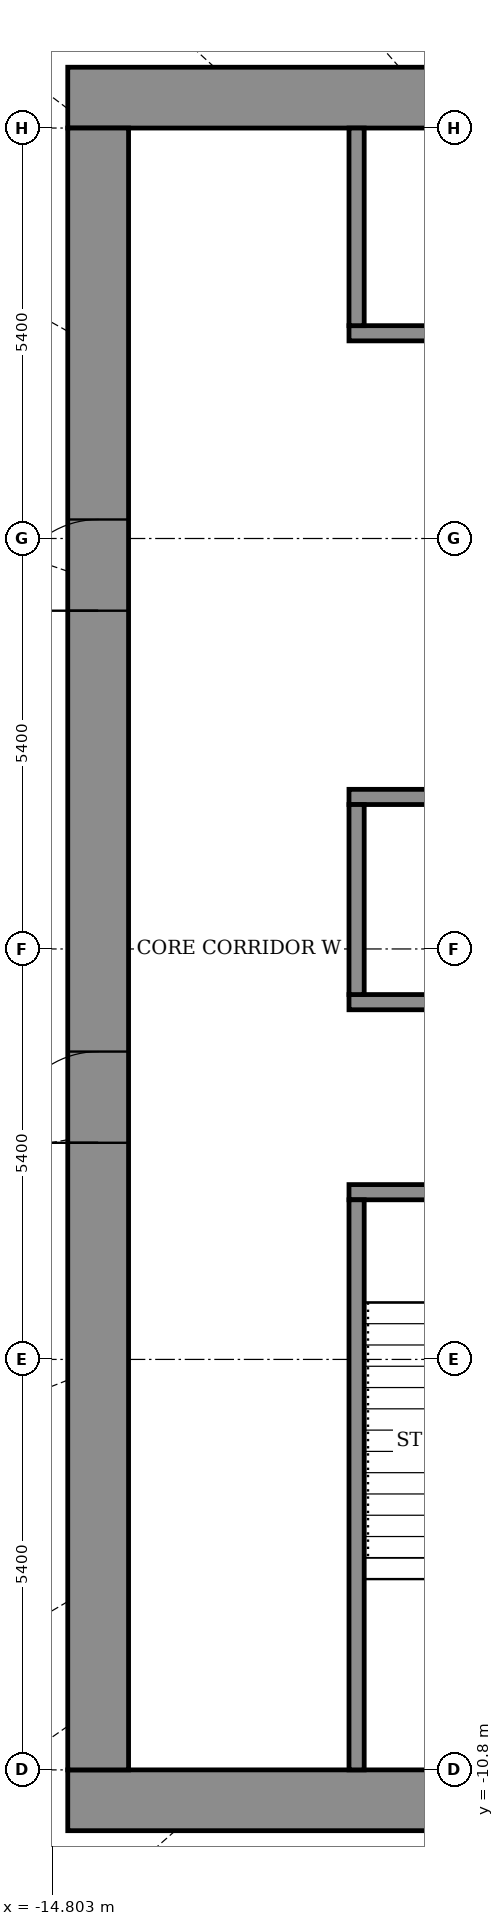
"""IFC4 building model, lengths in metres.
Left out: names, types, materials, properties, quantities, classifications, styles, units other than length and angle.
Written with IfcOpenShell. Run it as: python <this file> out.ifc"""

import sys

from ifc_helpers import new_model, si_unit, direction, frame, frame_2d, origin, place, context, subcontext, project, spatial, rectangle, extrude, element, fill, save


model = new_model("IFC4")
c1 = context("Model", 3, precision=1e-05, world=origin(), true_north=direction((0.0, 1.0)))
c2 = subcontext(c1, "Body", "Model", "MODEL_VIEW")
j1 = project(units=[si_unit("LENGTHUNIT", "METRE"), si_unit("PLANEANGLEUNIT", "RADIAN")], contexts=[c1])
p1 = place(None, origin())
s1 = spatial("IfcSite", under=j1, at=p1, CompositionType="ELEMENT")
p2 = place(p1, origin())
s2 = spatial("IfcBuilding", under=s1, at=p2, CompositionType="ELEMENT")
p3 = place(p2, frame((0.0, 0.0, 193.3)))
s3 = spatial("IfcBuildingStorey", under=s2, at=p3, CompositionType="ELEMENT", Elevation=193.3)
for number, where, z_axis, x_axis in (
    (1, (-14.6, -11.2, 0.0), (0.0, 0.0, 1.0), (1.0, 0.0, 0.0)),
    (2, (-14.6, 11.2, 0.0), (0.0, 0.0, 1.0), (1.0, 0.0, 0.0)),
):
    element("IfcWall", number, at=place(p3, frame(where, z_axis=z_axis, x_axis=x_axis)), inside=s3, PredefinedType="SHEAR", context=c2, shape_type="SweptSolid", body=[
        extrude(rectangle(XDim=29.2, YDim=0.8, at=frame_2d((14.6, 0.0))), origin(), (0.0, 0.0, 1.0), 4.6),
    ])
p4 = place(p3, frame((-14.2, -10.8, 0.0), z_axis=(0.0, 0.0, 1.0), x_axis=(0.0, 1.0, 0.0)))
e3 = element("IfcWall", 3, at=p4, inside=s3, PredefinedType="SHEAR", context=c2, shape_type="SweptSolid", body=[
    extrude(rectangle(XDim=21.6, YDim=0.8, at=frame_2d((10.8, 0.0))), origin(), (0.0, 0.0, 1.0), 4.6),
])
p5 = place(p4, frame((8.25, 0.0, 0.0)))
e4 = element("IfcOpeningElement", 4, at=p5, cuts=e3, PredefinedType="OPENING", context=c2, shape_type="SweptSolid", body=[
    extrude(rectangle(XDim=1.2, YDim=2.1, at=frame_2d((0.6, 1.05))), frame((0.0, 0.41, 0.0), z_axis=(0.0, -1.0, 0.0), x_axis=(1.0, 0.0, 0.0)), (0.0, 0.0, 1.0), 0.82),
])
p6 = place(p4, frame((15.25, 0.0, 0.0)))
e5 = element("IfcOpeningElement", 5, at=p6, cuts=e3, PredefinedType="OPENING", context=c2, shape_type="SweptSolid", body=[
    extrude(rectangle(XDim=1.2, YDim=2.1, at=frame_2d((0.6, 1.05))), frame((0.0, 0.41, 0.0), z_axis=(0.0, -1.0, 0.0), x_axis=(1.0, 0.0, 0.0)), (0.0, 0.0, 1.0), 0.82),
])
p7 = place(p3, frame((-10.9, -3.2, 0.0), z_axis=(0.0, 0.0, 1.0), x_axis=(1.0, 0.0, 0.0)))
e6 = element("IfcWall", 6, at=p7, inside=s3, PredefinedType="SHEAR", context=c2, shape_type="SweptSolid", body=[
    extrude(rectangle(XDim=21.8, YDim=0.2, at=frame_2d((10.9, 0.0))), origin(), (0.0, 0.0, 1.0), 4.05),
])
p8 = place(p7, frame((1.075, 0.0, 0.0)))
e7 = element("IfcOpeningElement", 7, at=p8, cuts=e6, PredefinedType="OPENING", context=c2, shape_type="SweptSolid", body=[
    extrude(rectangle(XDim=1.1, YDim=2.1, at=frame_2d((0.55, 1.05))), frame((0.0, 0.11, 0.0), z_axis=(0.0, -1.0, 0.0), x_axis=(1.0, 0.0, 0.0)), (0.0, 0.0, 1.0), 0.22),
])
p9 = place(p7, frame((10.325, 0.0, 0.0)))
e8 = element("IfcOpeningElement", 8, at=p9, cuts=e6, PredefinedType="OPENING", context=c2, shape_type="SweptSolid", body=[
    extrude(rectangle(XDim=1.1, YDim=2.1, at=frame_2d((0.55, 1.05))), frame((0.0, 0.11, 0.0), z_axis=(0.0, -1.0, 0.0), x_axis=(1.0, 0.0, 0.0)), (0.0, 0.0, 1.0), 0.22),
])
p10 = place(p7, frame((19.625, 0.0, 0.0)))
e9 = element("IfcOpeningElement", 9, at=p10, cuts=e6, PredefinedType="OPENING", context=c2, shape_type="SweptSolid", body=[
    extrude(rectangle(XDim=1.1, YDim=2.1, at=frame_2d((0.55, 1.05))), frame((0.0, 0.11, 0.0), z_axis=(0.0, -1.0, 0.0), x_axis=(1.0, 0.0, 0.0)), (0.0, 0.0, 1.0), 0.22),
])
p11 = place(p7, frame((5.7, 0.0, 0.0)))
e10 = element("IfcOpeningElement", 10, at=p11, cuts=e6, PredefinedType="OPENING", context=c2, shape_type="SweptSolid", body=[
    extrude(rectangle(XDim=1.1, YDim=2.1, at=frame_2d((0.55, 1.05))), frame((0.0, 0.11, 0.0), z_axis=(0.0, -1.0, 0.0), x_axis=(1.0, 0.0, 0.0)), (0.0, 0.0, 1.0), 0.22),
])
p12 = place(p7, frame((14.975, 0.0, 0.0)))
e11 = element("IfcOpeningElement", 11, at=p12, cuts=e6, PredefinedType="OPENING", context=c2, shape_type="SweptSolid", body=[
    extrude(rectangle(XDim=1.1, YDim=2.1, at=frame_2d((0.55, 1.05))), frame((0.0, 0.11, 0.0), z_axis=(0.0, -1.0, 0.0), x_axis=(1.0, 0.0, 0.0)), (0.0, 0.0, 1.0), 0.22),
])
p13 = place(p3, frame((-10.9, -0.7, 0.0), z_axis=(0.0, 0.0, 1.0), x_axis=(1.0, 0.0, 0.0)))
e12 = element("IfcWall", 12, at=p13, inside=s3, PredefinedType="SHEAR", context=c2, shape_type="SweptSolid", body=[
    extrude(rectangle(XDim=21.8, YDim=0.2, at=frame_2d((10.9, 0.0))), origin(), (0.0, 0.0, 1.0), 4.05),
])
p14 = place(p3, frame((-10.9, 2.0, 0.0), z_axis=(0.0, 0.0, 1.0), x_axis=(1.0, 0.0, 0.0)))
e13 = element("IfcWall", 13, at=p14, inside=s3, PredefinedType="SHEAR", context=c2, shape_type="SweptSolid", body=[
    extrude(rectangle(XDim=21.8, YDim=0.2, at=frame_2d((10.9, 0.0))), origin(), (0.0, 0.0, 1.0), 4.05),
])
p15 = place(p14, frame((14.4, 0.0, 0.0)))
e14 = element("IfcOpeningElement", 14, at=p15, cuts=e13, PredefinedType="OPENING", context=c2, shape_type="SweptSolid", body=[
    extrude(rectangle(XDim=1.1, YDim=2.1, at=frame_2d((0.55, 1.05))), frame((0.0, 0.11, 0.0), z_axis=(0.0, -1.0, 0.0), x_axis=(1.0, 0.0, 0.0)), (0.0, 0.0, 1.0), 0.22),
])
p16 = place(p14, frame((17.1, 0.0, 0.0)))
e15 = element("IfcOpeningElement", 15, at=p16, cuts=e13, PredefinedType="OPENING", context=c2, shape_type="SweptSolid", body=[
    extrude(rectangle(XDim=1.1, YDim=2.1, at=frame_2d((0.55, 1.05))), frame((0.0, 0.11, 0.0), z_axis=(0.0, -1.0, 0.0), x_axis=(1.0, 0.0, 0.0)), (0.0, 0.0, 1.0), 0.22),
])
p17 = place(p14, frame((19.8, 0.0, 0.0)))
e16 = element("IfcOpeningElement", 16, at=p17, cuts=e13, PredefinedType="OPENING", context=c2, shape_type="SweptSolid", body=[
    extrude(rectangle(XDim=1.1, YDim=2.1, at=frame_2d((0.55, 1.05))), frame((0.0, 0.11, 0.0), z_axis=(0.0, -1.0, 0.0), x_axis=(1.0, 0.0, 0.0)), (0.0, 0.0, 1.0), 0.22),
])
p18 = place(p14, frame((6.4, 0.0, 0.0)))
e17 = element("IfcOpeningElement", 17, at=p18, cuts=e13, PredefinedType="OPENING", context=c2, shape_type="SweptSolid", body=[
    extrude(rectangle(XDim=0.9, YDim=2.1, at=frame_2d((0.45, 1.05))), frame((0.0, 0.11, 0.0), z_axis=(0.0, -1.0, 0.0), x_axis=(1.0, 0.0, 0.0)), (0.0, 0.0, 1.0), 0.22),
])
p19 = place(p3, frame((-10.9, 8.1, 0.0), z_axis=(0.0, 0.0, 1.0), x_axis=(1.0, 0.0, 0.0)))
e18 = element("IfcWall", 18, at=p19, inside=s3, PredefinedType="SHEAR", context=c2, shape_type="SweptSolid", body=[
    extrude(rectangle(XDim=21.8, YDim=0.2, at=frame_2d((10.9, 0.0))), origin(), (0.0, 0.0, 1.0), 4.05),
])
p20 = place(p19, frame((14.4, 0.0, 0.0)))
e19 = element("IfcOpeningElement", 19, at=p20, cuts=e18, PredefinedType="OPENING", context=c2, shape_type="SweptSolid", body=[
    extrude(rectangle(XDim=1.1, YDim=2.1, at=frame_2d((0.55, 1.05))), frame((0.0, 0.11, 0.0), z_axis=(0.0, -1.0, 0.0), x_axis=(1.0, 0.0, 0.0)), (0.0, 0.0, 1.0), 0.22),
])
p21 = place(p19, frame((17.1, 0.0, 0.0)))
e20 = element("IfcOpeningElement", 20, at=p21, cuts=e18, PredefinedType="OPENING", context=c2, shape_type="SweptSolid", body=[
    extrude(rectangle(XDim=1.1, YDim=2.1, at=frame_2d((0.55, 1.05))), frame((0.0, 0.11, 0.0), z_axis=(0.0, -1.0, 0.0), x_axis=(1.0, 0.0, 0.0)), (0.0, 0.0, 1.0), 0.22),
])
p22 = place(p19, frame((19.8, 0.0, 0.0)))
e21 = element("IfcOpeningElement", 21, at=p22, cuts=e18, PredefinedType="OPENING", context=c2, shape_type="SweptSolid", body=[
    extrude(rectangle(XDim=1.1, YDim=2.1, at=frame_2d((0.55, 1.05))), frame((0.0, 0.11, 0.0), z_axis=(0.0, -1.0, 0.0), x_axis=(1.0, 0.0, 0.0)), (0.0, 0.0, 1.0), 0.22),
])
p23 = place(p19, frame((1.675, 0.0, 0.0)))
e22 = element("IfcOpeningElement", 22, at=p23, cuts=e18, PredefinedType="OPENING", context=c2, shape_type="SweptSolid", body=[
    extrude(rectangle(XDim=0.9, YDim=2.1, at=frame_2d((0.45, 1.05))), frame((0.0, 0.11, 0.0), z_axis=(0.0, -1.0, 0.0), x_axis=(1.0, 0.0, 0.0)), (0.0, 0.0, 1.0), 0.22),
])
p24 = place(p19, frame((8.425, 0.0, 0.0)))
e23 = element("IfcOpeningElement", 23, at=p24, cuts=e18, PredefinedType="OPENING", context=c2, shape_type="SweptSolid", body=[
    extrude(rectangle(XDim=0.9, YDim=2.1, at=frame_2d((0.45, 1.05))), frame((0.0, 0.11, 0.0), z_axis=(0.0, -1.0, 0.0), x_axis=(1.0, 0.0, 0.0)), (0.0, 0.0, 1.0), 0.22),
])
p25 = place(p3, frame((-10.8, -10.8, 0.0), z_axis=(0.0, 0.0, 1.0), x_axis=(0.0, 1.0, 0.0)))
e24 = element("IfcWall", 24, at=p25, inside=s3, PredefinedType="SHEAR", context=c2, shape_type="SweptSolid", body=[
    extrude(rectangle(XDim=7.5, YDim=0.2, at=frame_2d((3.75, 0.0))), origin(), (0.0, 0.0, 1.0), 4.05),
])
p26 = place(p3, frame((-10.8, -0.6, 0.0), z_axis=(0.0, 0.0, 1.0), x_axis=(0.0, 1.0, 0.0)))
e25 = element("IfcWall", 25, at=p26, inside=s3, PredefinedType="STANDARD", context=c2, shape_type="SweptSolid", body=[
    extrude(rectangle(XDim=2.5, YDim=0.2, at=frame_2d((1.25, 0.0))), origin(), (0.0, 0.0, 1.0), 4.05),
])
p27 = place(p3, frame((-10.8, 8.2, 0.0), z_axis=(0.0, 0.0, 1.0), x_axis=(0.0, 1.0, 0.0)))
e26 = element("IfcWall", 26, at=p27, inside=s3, PredefinedType="STANDARD", context=c2, shape_type="SweptSolid", body=[
    extrude(rectangle(XDim=2.6, YDim=0.2, at=frame_2d((1.3, 0.0))), origin(), (0.0, 0.0, 1.0), 4.05),
])
p28 = place(p5, origin())
e27 = element("IfcDoor", 27, at=p28, inside=s3, OperationType="DOUBLE_DOOR_SINGLE_SWING", PredefinedType="DOOR", context=c2, shape_type="SweptSolid", body=[
    extrude(rectangle(XDim=1.2, YDim=2.1, at=frame_2d((0.6, 1.05))), frame((0.0, 0.025, 0.0), z_axis=(0.0, -1.0, 0.0), x_axis=(1.0, 0.0, 0.0)), (0.0, 0.0, 1.0), 0.05),
])
fill(e4, e27)
p29 = place(p6, origin())
e28 = element("IfcDoor", 28, at=p29, inside=s3, OperationType="DOUBLE_DOOR_SINGLE_SWING", PredefinedType="DOOR", context=c2, shape_type="SweptSolid", body=[
    extrude(rectangle(XDim=1.2, YDim=2.1, at=frame_2d((0.6, 1.05))), frame((0.0, 0.025, 0.0), z_axis=(0.0, -1.0, 0.0), x_axis=(1.0, 0.0, 0.0)), (0.0, 0.0, 1.0), 0.05),
])
fill(e5, e28)
save(model, sys.argv[1])
